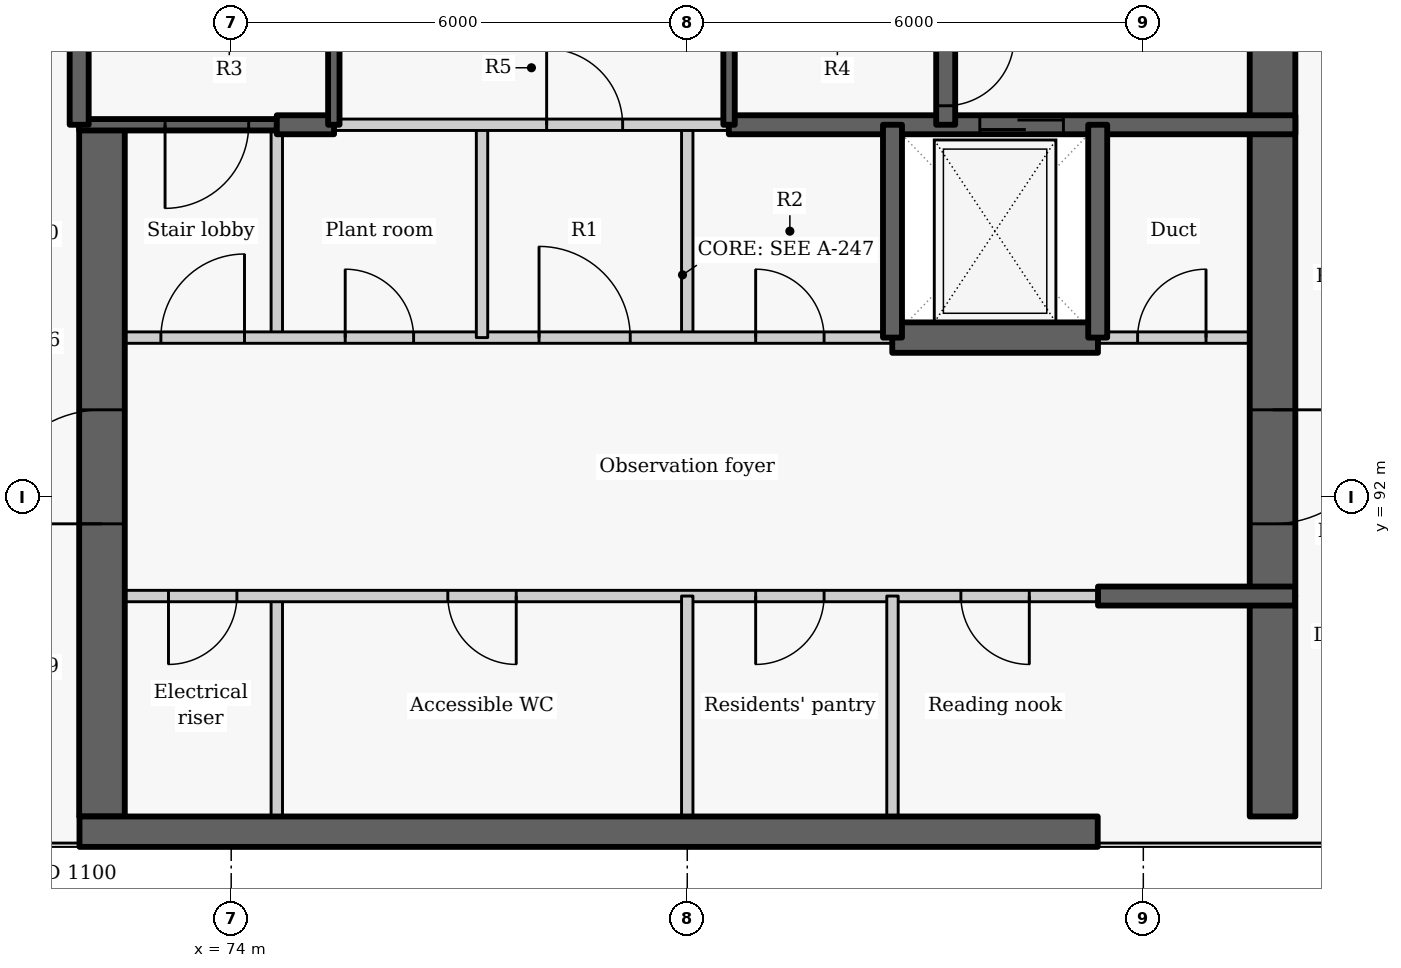
"""IFC4 building model, lengths in metres.
Left out: names, types, materials, properties, quantities, classifications, styles, units other than length and angle.
Written with IfcOpenShell. Run it as: python <this file> out.ifc"""

import sys

from ifc_helpers import new_model, si_unit, direction, frame, frame_2d, origin, place, context, subcontext, project, spatial, rectangle, extrude, element, fill, save


model = new_model("IFC4")
c1 = context("Model", 3, precision=1e-05, world=origin(), true_north=direction((0.0, 1.0)))
c2 = subcontext(c1, "Body", "Model", "MODEL_VIEW")
j1 = project(units=[si_unit("LENGTHUNIT", "METRE"), si_unit("PLANEANGLEUNIT", "RADIAN")], contexts=[c1])
p1 = place(None, origin())
s1 = spatial("IfcSite", under=j1, at=p1, CompositionType="ELEMENT")
p2 = place(p1, origin())
s2 = spatial("IfcBuilding", under=s1, at=p2, CompositionType="ELEMENT")
p3 = place(p2, frame((0.0, 0.0, 279.6)))
s3 = spatial("IfcBuildingStorey", under=s2, at=p3, CompositionType="ELEMENT", Elevation=279.6)
p4 = place(p3, frame((74.6, 87.8, 0.0), z_axis=(0.0, 0.0, 1.0), x_axis=(0.0, 1.0, 0.0)))
e1 = element("IfcWall", 1, at=p4, inside=s3, PredefinedType="PARTITIONING", context=c2, shape_type="SweptSolid", body=[
    extrude(rectangle(XDim=2.9, YDim=0.15, at=frame_2d((1.45, 0.0))), origin(), (0.0, 0.0, 1.0), 3.325),
])
p5 = place(p3, frame((74.6, 94.1, 0.0), z_axis=(0.0, 0.0, 1.0), x_axis=(0.0, 1.0, 0.0)))
e2 = element("IfcWall", 2, at=p5, inside=s3, PredefinedType="PARTITIONING", context=c2, shape_type="SweptSolid", body=[
    extrude(rectangle(XDim=2.8, YDim=0.15, at=frame_2d((1.4, 0.0))), origin(), (0.0, 0.0, 1.0), 3.325),
])
p6 = place(p3, frame((85.4, 90.7, 0.0), z_axis=(0.0, 0.0, 1.0), x_axis=(-1.0, 0.0, 0.0)))
e3 = element("IfcWall", 3, at=p6, inside=s3, PredefinedType="PARTITIONING", context=c2, shape_type="SweptSolid", body=[
    extrude(rectangle(XDim=13.4, YDim=0.15, at=frame_2d((6.7, 0.0))), origin(), (0.0, 0.0, 1.0), 3.325),
])
p7 = place(p6, frame((11.325, 0.0, 0.0)))
e4 = element("IfcOpeningElement", 4, at=p7, cuts=e3, PredefinedType="OPENING", context=c2, shape_type="SweptSolid", body=[
    extrude(rectangle(XDim=0.9, YDim=2.1, at=frame_2d((0.45, 1.05))), frame((0.0, 0.085, 0.0), z_axis=(0.0, -1.0, 0.0), x_axis=(1.0, 0.0, 0.0)), (0.0, 0.0, 1.0), 0.17),
])
p8 = place(p6, frame((7.65, 0.0, 0.0)))
e5 = element("IfcOpeningElement", 5, at=p8, cuts=e3, PredefinedType="OPENING", context=c2, shape_type="SweptSolid", body=[
    extrude(rectangle(XDim=0.9, YDim=2.1, at=frame_2d((0.45, 1.05))), frame((0.0, 0.085, 0.0), z_axis=(0.0, -1.0, 0.0), x_axis=(1.0, 0.0, 0.0)), (0.0, 0.0, 1.0), 0.17),
])
p9 = place(p6, frame((3.6, 0.0, 0.0)))
e6 = element("IfcOpeningElement", 6, at=p9, cuts=e3, PredefinedType="OPENING", context=c2, shape_type="SweptSolid", body=[
    extrude(rectangle(XDim=0.9, YDim=2.1, at=frame_2d((0.45, 1.05))), frame((0.0, 0.085, 0.0), z_axis=(0.0, -1.0, 0.0), x_axis=(1.0, 0.0, 0.0)), (0.0, 0.0, 1.0), 0.17),
])
p10 = place(p6, frame((0.9, 0.0, 0.0)))
e7 = element("IfcOpeningElement", 7, at=p10, cuts=e3, PredefinedType="OPENING", context=c2, shape_type="SweptSolid", body=[
    extrude(rectangle(XDim=0.9, YDim=2.1, at=frame_2d((0.45, 1.05))), frame((0.0, 0.085, 0.0), z_axis=(0.0, -1.0, 0.0), x_axis=(1.0, 0.0, 0.0)), (0.0, 0.0, 1.0), 0.17),
])
p11 = place(p3, frame((72.3, 87.8, -0.275), z_axis=(0.0, 0.0, 1.0), x_axis=(0.0, 1.0, 0.0)))
e8 = element("IfcWall", 8, at=p11, inside=s3, PredefinedType="SHEAR", context=c2, shape_type="SweptSolid", body=[
    extrude(rectangle(XDim=9.1, YDim=0.6, at=frame_2d((4.55, 0.0))), origin(), (0.0, 0.0, 1.0), 3.6),
])
p12 = place(p11, frame((3.85, 0.0, 0.275)))
e9 = element("IfcOpeningElement", 9, at=p12, cuts=e8, PredefinedType="OPENING", context=c2, shape_type="SweptSolid", body=[
    extrude(rectangle(XDim=1.5, YDim=2.1, at=frame_2d((0.75, 1.05))), frame((0.0, 0.31, 0.0), z_axis=(0.0, -1.0, 0.0), x_axis=(1.0, 0.0, 0.0)), (0.0, 0.0, 1.0), 0.62),
])
p13 = place(p3, frame((80.0, 87.8, 0.0), z_axis=(0.0, 0.0, 1.0), x_axis=(0.0, 1.0, 0.0)))
e10 = element("IfcWall", 10, at=p13, inside=s3, PredefinedType="PARTITIONING", context=c2, shape_type="SweptSolid", body=[
    extrude(rectangle(XDim=2.9, YDim=0.15, at=frame_2d((1.45, 0.0))), origin(), (0.0, 0.0, 1.0), 3.325),
])
p14 = place(p3, frame((80.0, 94.1, 0.0), z_axis=(0.0, 0.0, 1.0), x_axis=(0.0, 1.0, 0.0)))
e11 = element("IfcWall", 11, at=p14, inside=s3, PredefinedType="PARTITIONING", context=c2, shape_type="SweptSolid", body=[
    extrude(rectangle(XDim=2.8, YDim=0.15, at=frame_2d((1.4, 0.0))), origin(), (0.0, 0.0, 1.0), 3.325),
])
p15 = place(p3, frame((82.7, 87.8, 0.0), z_axis=(0.0, 0.0, 1.0), x_axis=(0.0, 1.0, 0.0)))
e12 = element("IfcWall", 12, at=p15, inside=s3, PredefinedType="PARTITIONING", context=c2, shape_type="SweptSolid", body=[
    extrude(rectangle(XDim=2.9, YDim=0.15, at=frame_2d((1.45, 0.0))), origin(), (0.0, 0.0, 1.0), 3.325),
])
p16 = place(p3, frame((72.0, 94.1, 0.0), z_axis=(0.0, 0.0, 1.0), x_axis=(1.0, 0.0, 0.0)))
e13 = element("IfcWall", 13, at=p16, inside=s3, PredefinedType="PARTITIONING", context=c2, shape_type="SweptSolid", body=[
    extrude(rectangle(XDim=10.703, YDim=0.15, at=frame_2d((5.352, 0.0))), origin(), (0.0, 0.0, 1.0), 3.325),
])
p17 = place(p16, frame((1.075, 0.0, 0.0)))
e14 = element("IfcOpeningElement", 14, at=p17, cuts=e13, PredefinedType="OPENING", context=c2, shape_type="SweptSolid", body=[
    extrude(rectangle(XDim=1.1, YDim=2.1, at=frame_2d((0.55, 1.05))), frame((0.0, 0.085, 0.0), z_axis=(0.0, -1.0, 0.0), x_axis=(1.0, 0.0, 0.0)), (0.0, 0.0, 1.0), 0.17),
])
p18 = place(p16, frame((3.5, 0.0, 0.0)))
e15 = element("IfcOpeningElement", 15, at=p18, cuts=e13, PredefinedType="OPENING", context=c2, shape_type="SweptSolid", body=[
    extrude(rectangle(XDim=0.9, YDim=2.1, at=frame_2d((0.45, 1.05))), frame((0.0, 0.085, 0.0), z_axis=(0.0, -1.0, 0.0), x_axis=(1.0, 0.0, 0.0)), (0.0, 0.0, 1.0), 0.17),
])
p19 = place(p16, frame((6.05, 0.0, 0.0)))
e16 = element("IfcOpeningElement", 16, at=p19, cuts=e13, PredefinedType="OPENING", context=c2, shape_type="SweptSolid", body=[
    extrude(rectangle(XDim=1.2, YDim=2.1, at=frame_2d((0.6, 1.05))), frame((0.0, 0.085, 0.0), z_axis=(0.0, -1.0, 0.0), x_axis=(1.0, 0.0, 0.0)), (0.0, 0.0, 1.0), 0.17),
])
p20 = place(p16, frame((8.9, 0.0, 0.0)))
e17 = element("IfcOpeningElement", 17, at=p20, cuts=e13, PredefinedType="OPENING", context=c2, shape_type="SweptSolid", body=[
    extrude(rectangle(XDim=0.9, YDim=2.1, at=frame_2d((0.45, 1.05))), frame((0.0, 0.085, 0.0), z_axis=(0.0, -1.0, 0.0), x_axis=(1.0, 0.0, 0.0)), (0.0, 0.0, 1.0), 0.17),
])
p21 = place(p3, frame((85.397, 94.1, 0.0), z_axis=(0.0, 0.0, 1.0), x_axis=(1.0, 0.0, 0.0)))
e18 = element("IfcWall", 18, at=p21, inside=s3, PredefinedType="PARTITIONING", context=c2, shape_type="SweptSolid", body=[
    extrude(rectangle(XDim=2.603, YDim=0.15, at=frame_2d((1.302, 0.0))), origin(), (0.0, 0.0, 1.0), 3.325),
])
p22 = place(p21, frame((0.528, 0.0, 0.0)))
e19 = element("IfcOpeningElement", 19, at=p22, cuts=e18, PredefinedType="OPENING", context=c2, shape_type="SweptSolid", body=[
    extrude(rectangle(XDim=0.9, YDim=2.1, at=frame_2d((0.45, 1.05))), frame((0.0, 0.085, 0.0), z_axis=(0.0, -1.0, 0.0), x_axis=(1.0, 0.0, 0.0)), (0.0, 0.0, 1.0), 0.17),
])
p23 = place(p3, frame((82.697, 94.1, -0.275), z_axis=(0.0, 0.0, 1.0), x_axis=(1.0, 0.0, 0.0)))
e20 = element("IfcWall", 20, at=p23, inside=s3, PredefinedType="SHEAR", context=c2, shape_type="SweptSolid", body=[
    extrude(rectangle(XDim=2.706, YDim=0.4, at=frame_2d((1.353, 0.0))), origin(), (0.0, 0.0, 1.0), 3.6),
])
p24 = place(p3, frame((87.7, 102.05, -0.275), z_axis=(0.0, 0.0, 1.0), x_axis=(0.0, -1.0, 0.0)))
e21 = element("IfcWall", 21, at=p24, inside=s3, PredefinedType="SHEAR", context=c2, shape_type="SweptSolid", body=[
    extrude(rectangle(XDim=11.35, YDim=0.6, at=frame_2d((5.675, 0.0))), origin(), (0.0, 0.0, 1.0), 3.6),
])
p25 = place(p24, frame((8.9, 0.0, 0.275)))
e22 = element("IfcOpeningElement", 22, at=p25, cuts=e21, PredefinedType="OPENING", context=c2, shape_type="SweptSolid", body=[
    extrude(rectangle(XDim=1.5, YDim=2.1, at=frame_2d((0.75, 1.05))), frame((0.0, 0.31, 0.0), z_axis=(0.0, -1.0, 0.0), x_axis=(1.0, 0.0, 0.0)), (0.0, 0.0, 1.0), 0.62),
])
p26 = place(p24, frame((2.025, 0.0, 0.275)))
e23 = element("IfcOpeningElement", 23, at=p26, cuts=e21, PredefinedType="OPENING", context=c2, shape_type="SweptSolid", body=[
    extrude(rectangle(XDim=1.1, YDim=2.1, at=frame_2d((0.55, 1.05))), frame((0.0, 0.31, 0.0), z_axis=(0.0, -1.0, 0.0), x_axis=(1.0, 0.0, 0.0)), (0.0, 0.0, 1.0), 0.62),
])
p27 = place(p3, frame((74.6, 96.9, -0.275), z_axis=(0.0, 0.0, 1.0), x_axis=(-1.0, 0.0, 0.0)))
e24 = element("IfcWall", 24, at=p27, inside=s3, PredefinedType="SHEAR", context=c2, shape_type="SweptSolid", body=[
    extrude(rectangle(XDim=2.6, YDim=0.15, at=frame_2d((1.3, 0.0))), origin(), (0.0, 0.0, 1.0), 3.6),
])
p28 = place(p27, frame((0.37, 0.0, 0.275)))
e25 = element("IfcOpeningElement", 25, at=p28, cuts=e24, PredefinedType="OPENING", context=c2, shape_type="SweptSolid", body=[
    extrude(rectangle(XDim=1.1, YDim=2.1, at=frame_2d((0.55, 1.05))), frame((0.0, 0.085, 0.0), z_axis=(0.0, -1.0, 0.0), x_axis=(1.0, 0.0, 0.0)), (0.0, 0.0, 1.0), 0.17),
])
p29 = place(p3, frame((77.3, 94.1, 0.0), z_axis=(0.0, 0.0, 1.0), x_axis=(0.0, 1.0, 0.0)))
e26 = element("IfcWall", 26, at=p29, inside=s3, PredefinedType="PARTITIONING", context=c2, shape_type="SweptSolid", body=[
    extrude(rectangle(XDim=2.8, YDim=0.15, at=frame_2d((1.4, 0.0))), origin(), (0.0, 0.0, 1.0), 3.325),
])
p30 = place(p3, frame((74.6, 96.9, -0.275), z_axis=(0.0, 0.0, 1.0), x_axis=(1.0, 0.0, 0.0)))
e27 = element("IfcWall", 27, at=p30, inside=s3, PredefinedType="SHEAR", context=c2, shape_type="SweptSolid", body=[
    extrude(rectangle(XDim=0.753, YDim=0.25, at=frame_2d((0.376, 0.0))), origin(), (0.0, 0.0, 1.0), 3.6),
])
p31 = place(p3, frame((80.547, 96.9, -0.275), z_axis=(0.0, 0.0, 1.0), x_axis=(1.0, 0.0, 0.0)))
e28 = element("IfcWall", 28, at=p31, inside=s3, PredefinedType="SHEAR", context=c2, shape_type="SweptSolid", body=[
    extrude(rectangle(XDim=7.453, YDim=0.25, at=frame_2d((3.727, 0.0))), origin(), (0.0, 0.0, 1.0), 3.6),
])
p32 = place(p31, frame((3.302, 0.0, 0.275)))
e29 = element("IfcOpeningElement", 29, at=p32, cuts=e28, PredefinedType="OPENING", context=c2, shape_type="SweptSolid", body=[
    extrude(rectangle(XDim=1.1, YDim=2.1, at=frame_2d((0.55, 1.05))), frame((0.0, 0.135, 0.0), z_axis=(0.0, -1.0, 0.0), x_axis=(1.0, 0.0, 0.0)), (0.0, 0.0, 1.0), 0.27),
])
p33 = place(p3, frame((75.347, 96.9, 0.0), z_axis=(0.0, 0.0, 1.0), x_axis=(1.0, 0.0, 0.0)))
e30 = element("IfcWall", 30, at=p33, inside=s3, PredefinedType="PARTITIONING", context=c2, shape_type="SweptSolid", body=[
    extrude(rectangle(XDim=5.206, YDim=0.15, at=frame_2d((2.603, 0.0))), origin(), (0.0, 0.0, 1.0), 3.325),
])
p34 = place(p33, frame((2.803, 0.0, 0.0)))
e31 = element("IfcOpeningElement", 31, at=p34, cuts=e30, PredefinedType="OPENING", context=c2, shape_type="SweptSolid", body=[
    extrude(rectangle(XDim=1.0, YDim=2.1, at=frame_2d((0.5, 1.05))), frame((0.0, 0.085, 0.0), z_axis=(0.0, -1.0, 0.0), x_axis=(1.0, 0.0, 0.0)), (0.0, 0.0, 1.0), 0.17),
])
for number, where, z_axis, x_axis in (
    (32, (82.7, 94.1, -0.275), (0.0, 0.0, 1.0), (0.0, 1.0, 0.0)),
    (33, (85.4, 94.1, -0.275), (0.0, 0.0, 1.0), (0.0, 1.0, 0.0)),
):
    element("IfcWall", number, at=place(p3, frame(where, z_axis=z_axis, x_axis=x_axis)), inside=s3, PredefinedType="SHEAR", context=c2, shape_type="SweptSolid", body=[
        extrude(rectangle(XDim=2.8, YDim=0.25, at=frame_2d((1.4, 0.0))), origin(), (0.0, 0.0, 1.0), 3.6),
    ])
p35 = place(p3, frame((75.35, 96.9, -0.275), z_axis=(0.0, 0.0, 1.0), x_axis=(0.0, 1.0, 0.0)))
e34 = element("IfcWall", 34, at=p35, inside=s3, PredefinedType="SHEAR", context=c2, shape_type="SweptSolid", body=[
    extrude(rectangle(XDim=1.503, YDim=0.15, at=frame_2d((0.751, 0.0))), origin(), (0.0, 0.0, 1.0), 3.6),
])
p36 = place(p3, frame((72.0, 96.9, -0.275), z_axis=(0.0, 0.0, 1.0), x_axis=(0.0, 1.0, 0.0)))
e35 = element("IfcWall", 35, at=p36, inside=s3, PredefinedType="SHEAR", context=c2, shape_type="SweptSolid", body=[
    extrude(rectangle(XDim=5.15, YDim=0.25, at=frame_2d((2.575, 0.0))), origin(), (0.0, 0.0, 1.0), 3.6),
])
p37 = place(p3, frame((83.4, 102.05, -0.275), z_axis=(0.0, 0.0, 1.0), x_axis=(0.0, -1.0, 0.0)))
e36 = element("IfcWall", 36, at=p37, inside=s3, PredefinedType="SHEAR", context=c2, shape_type="SweptSolid", body=[
    extrude(rectangle(XDim=5.15, YDim=0.25, at=frame_2d((2.575, 0.0))), origin(), (0.0, 0.0, 1.0), 3.6),
])
p38 = place(p37, frame((4.0, 0.0, 0.275)))
e37 = element("IfcOpeningElement", 37, at=p38, cuts=e36, PredefinedType="OPENING", context=c2, shape_type="SweptSolid", body=[
    extrude(rectangle(XDim=0.9, YDim=2.1, at=frame_2d((0.45, 1.05))), frame((0.0, 0.135, 0.0), z_axis=(0.0, -1.0, 0.0), x_axis=(1.0, 0.0, 0.0)), (0.0, 0.0, 1.0), 0.27),
])
p39 = place(p3, frame((80.55, 96.9, -0.275), z_axis=(0.0, 0.0, 1.0), x_axis=(0.0, 1.0, 0.0)))
e38 = element("IfcWall", 38, at=p39, inside=s3, PredefinedType="SHEAR", context=c2, shape_type="SweptSolid", body=[
    extrude(rectangle(XDim=1.503, YDim=0.15, at=frame_2d((0.751, 0.0))), origin(), (0.0, 0.0, 1.0), 3.6),
])
p40 = place(p3, frame((72.004, 87.6, -0.275), z_axis=(0.0, 0.0, 1.0), x_axis=(1.0, 0.0, 0.0)))
e39 = element("IfcWall", 39, at=p40, inside=s3, PredefinedType="SHEAR", context=c2, shape_type="SweptSolid", body=[
    extrude(rectangle(XDim=13.396, YDim=0.4, at=frame_2d((6.698, 0.0))), origin(), (0.0, 0.0, 1.0), 3.6),
])
p41 = place(p3, frame((87.7, 87.8, -0.275), z_axis=(0.0, 0.0, 1.0), x_axis=(0.0, 1.0, 0.0)))
e40 = element("IfcWall", 40, at=p41, inside=s3, PredefinedType="SHEAR", context=c2, shape_type="SweptSolid", body=[
    extrude(rectangle(XDim=2.896, YDim=0.6, at=frame_2d((1.448, 0.0))), origin(), (0.0, 0.0, 1.0), 3.6),
])
p42 = place(p3, frame((85.404, 90.7, -0.275), z_axis=(0.0, 0.0, 1.0), x_axis=(1.0, 0.0, 0.0)))
e41 = element("IfcWall", 41, at=p42, inside=s3, PredefinedType="SHEAR", context=c2, shape_type="SweptSolid", body=[
    extrude(rectangle(XDim=2.592, YDim=0.25, at=frame_2d((1.296, 0.0))), origin(), (0.0, 0.0, 1.0), 3.6),
])
p43 = place(p7, origin())
e42 = element("IfcDoor", 42, at=p43, inside=s3, OperationType="SINGLE_SWING_RIGHT", PredefinedType="DOOR", context=c2, shape_type="SweptSolid", body=[
    extrude(rectangle(XDim=0.9, YDim=2.1, at=frame_2d((0.45, 1.05))), frame((0.0, 0.025, 0.0), z_axis=(0.0, -1.0, 0.0), x_axis=(1.0, 0.0, 0.0)), (0.0, 0.0, 1.0), 0.05),
])
fill(e4, e42)
p44 = place(p8, origin())
e43 = element("IfcDoor", 43, at=p44, inside=s3, OperationType="SINGLE_SWING_LEFT", PredefinedType="DOOR", context=c2, shape_type="SweptSolid", body=[
    extrude(rectangle(XDim=0.9, YDim=2.1, at=frame_2d((0.45, 1.05))), frame((0.0, 0.025, 0.0), z_axis=(0.0, -1.0, 0.0), x_axis=(1.0, 0.0, 0.0)), (0.0, 0.0, 1.0), 0.05),
])
fill(e5, e43)
p45 = place(p9, origin())
e44 = element("IfcDoor", 44, at=p45, inside=s3, OperationType="SINGLE_SWING_RIGHT", PredefinedType="DOOR", context=c2, shape_type="SweptSolid", body=[
    extrude(rectangle(XDim=0.9, YDim=2.1, at=frame_2d((0.45, 1.05))), frame((0.0, 0.025, 0.0), z_axis=(0.0, -1.0, 0.0), x_axis=(1.0, 0.0, 0.0)), (0.0, 0.0, 1.0), 0.05),
])
fill(e6, e44)
p46 = place(p10, origin())
e45 = element("IfcDoor", 45, at=p46, inside=s3, OperationType="SINGLE_SWING_LEFT", PredefinedType="DOOR", context=c2, shape_type="SweptSolid", body=[
    extrude(rectangle(XDim=0.9, YDim=2.1, at=frame_2d((0.45, 1.05))), frame((0.0, 0.025, 0.0), z_axis=(0.0, -1.0, 0.0), x_axis=(1.0, 0.0, 0.0)), (0.0, 0.0, 1.0), 0.05),
])
fill(e7, e45)
p47 = place(p17, origin())
e46 = element("IfcDoor", 46, at=p47, inside=s3, OperationType="SINGLE_SWING_RIGHT", PredefinedType="DOOR", context=c2, shape_type="SweptSolid", body=[
    extrude(rectangle(XDim=1.1, YDim=2.1, at=frame_2d((0.55, 1.05))), frame((0.0, 0.025, 0.0), z_axis=(0.0, -1.0, 0.0), x_axis=(1.0, 0.0, 0.0)), (0.0, 0.0, 1.0), 0.05),
])
fill(e14, e46)
p48 = place(p18, origin())
e47 = element("IfcDoor", 47, at=p48, inside=s3, OperationType="SINGLE_SWING_LEFT", PredefinedType="DOOR", context=c2, shape_type="SweptSolid", body=[
    extrude(rectangle(XDim=0.9, YDim=2.1, at=frame_2d((0.45, 1.05))), frame((0.0, 0.025, 0.0), z_axis=(0.0, -1.0, 0.0), x_axis=(1.0, 0.0, 0.0)), (0.0, 0.0, 1.0), 0.05),
])
fill(e15, e47)
p49 = place(p19, origin())
e48 = element("IfcDoor", 48, at=p49, inside=s3, OperationType="DOUBLE_DOOR_SINGLE_SWING", PredefinedType="DOOR", context=c2, shape_type="SweptSolid", body=[
    extrude(rectangle(XDim=1.2, YDim=2.1, at=frame_2d((0.6, 1.05))), frame((0.0, 0.025, 0.0), z_axis=(0.0, -1.0, 0.0), x_axis=(1.0, 0.0, 0.0)), (0.0, 0.0, 1.0), 0.05),
])
fill(e16, e48)
p50 = place(p20, origin())
e49 = element("IfcDoor", 49, at=p50, inside=s3, OperationType="SINGLE_SWING_LEFT", PredefinedType="DOOR", context=c2, shape_type="SweptSolid", body=[
    extrude(rectangle(XDim=0.9, YDim=2.1, at=frame_2d((0.45, 1.05))), frame((0.0, 0.025, 0.0), z_axis=(0.0, -1.0, 0.0), x_axis=(1.0, 0.0, 0.0)), (0.0, 0.0, 1.0), 0.05),
])
fill(e17, e49)
p51 = place(p32, origin())
e50 = element("IfcDoor", 50, at=p51, inside=s3, OperationType="SLIDING_TO_LEFT", PredefinedType="DOOR", context=c2, shape_type="SweptSolid", body=[
    extrude(rectangle(XDim=1.1, YDim=2.1, at=frame_2d((0.55, 1.05))), frame((0.0, 0.025, 0.0), z_axis=(0.0, -1.0, 0.0), x_axis=(1.0, 0.0, 0.0)), (0.0, 0.0, 1.0), 0.05),
])
fill(e29, e50)
p52 = place(p22, origin())
e51 = element("IfcDoor", 51, at=p52, inside=s3, OperationType="SINGLE_SWING_RIGHT", PredefinedType="DOOR", context=c2, shape_type="SweptSolid", body=[
    extrude(rectangle(XDim=0.9, YDim=2.1, at=frame_2d((0.45, 1.05))), frame((0.0, 0.025, 0.0), z_axis=(0.0, -1.0, 0.0), x_axis=(1.0, 0.0, 0.0)), (0.0, 0.0, 1.0), 0.05),
])
fill(e19, e51)
p53 = place(p34, origin())
e52 = element("IfcDoor", 52, at=p53, inside=s3, OperationType="SINGLE_SWING_LEFT", PredefinedType="DOOR", context=c2, shape_type="SweptSolid", body=[
    extrude(rectangle(XDim=1.0, YDim=2.1, at=frame_2d((0.5, 1.05))), frame((0.0, 0.025, 0.0), z_axis=(0.0, -1.0, 0.0), x_axis=(1.0, 0.0, 0.0)), (0.0, 0.0, 1.0), 0.05),
])
fill(e31, e52)
p54 = place(p28, origin())
e53 = element("IfcDoor", 53, at=p54, inside=s3, OperationType="SINGLE_SWING_RIGHT", PredefinedType="DOOR", context=c2, shape_type="SweptSolid", body=[
    extrude(rectangle(XDim=1.1, YDim=2.1, at=frame_2d((0.55, 1.05))), frame((0.0, 0.025, 0.0), z_axis=(0.0, -1.0, 0.0), x_axis=(1.0, 0.0, 0.0)), (0.0, 0.0, 1.0), 0.05),
])
fill(e25, e53)
p55 = place(p38, origin())
e54 = element("IfcDoor", 54, at=p55, inside=s3, OperationType="SINGLE_SWING_LEFT", PredefinedType="DOOR", context=c2, shape_type="SweptSolid", body=[
    extrude(rectangle(XDim=0.9, YDim=2.1, at=frame_2d((0.45, 1.05))), frame((0.0, 0.025, 0.0), z_axis=(0.0, -1.0, 0.0), x_axis=(1.0, 0.0, 0.0)), (0.0, 0.0, 1.0), 0.05),
])
fill(e37, e54)
p56 = place(p25, origin())
e55 = element("IfcDoor", 55, at=p56, inside=s3, OperationType="DOUBLE_DOOR_SINGLE_SWING", PredefinedType="DOOR", context=c2, shape_type="SweptSolid", body=[
    extrude(rectangle(XDim=1.5, YDim=2.1, at=frame_2d((0.75, 1.05))), frame((0.0, 0.025, 0.0), z_axis=(0.0, -1.0, 0.0), x_axis=(1.0, 0.0, 0.0)), (0.0, 0.0, 1.0), 0.05),
])
fill(e22, e55)
p57 = place(p12, origin())
e56 = element("IfcDoor", 56, at=p57, inside=s3, OperationType="DOUBLE_DOOR_SINGLE_SWING", PredefinedType="DOOR", context=c2, shape_type="SweptSolid", body=[
    extrude(rectangle(XDim=1.5, YDim=2.1, at=frame_2d((0.75, 1.05))), frame((0.0, 0.025, 0.0), z_axis=(0.0, -1.0, 0.0), x_axis=(1.0, 0.0, 0.0)), (0.0, 0.0, 1.0), 0.05),
])
fill(e9, e56)
save(model, sys.argv[1])
